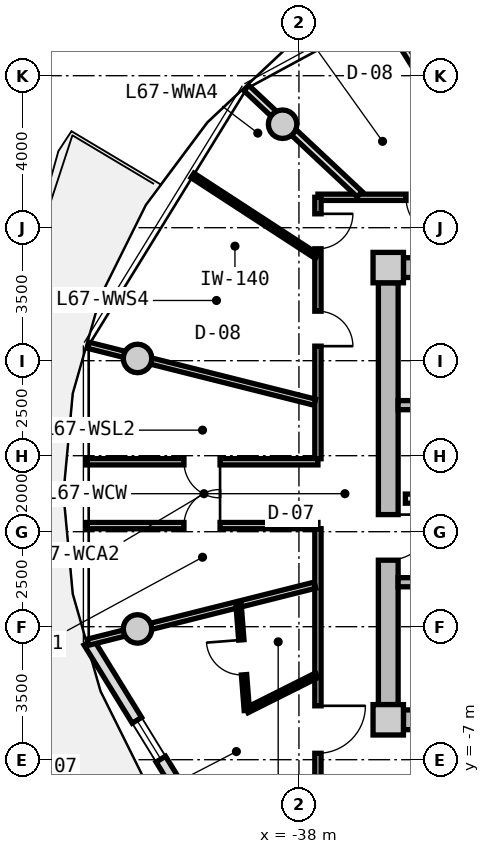
"""IFC4 building model, lengths in metres.
Left out: names, types, materials, properties, quantities, classifications, styles, units other than length and angle.
Written with IfcOpenShell. Run it as: python <this file> out.ifc"""

import sys

from ifc_helpers import new_model, si_unit, direction, frame, frame_2d, origin, origin_2d, place, context, subcontext, project, spatial, rectangle, circle, extrude, source, transform, mapped, element, fill, save


model = new_model("IFC4")
c1 = context("Model", 3, precision=1e-05, world=origin(), true_north=direction((0.0, 1.0)))
c2 = subcontext(c1, "Body", "Model", "MODEL_VIEW")
j1 = project(units=[si_unit("LENGTHUNIT", "METRE"), si_unit("PLANEANGLEUNIT", "RADIAN")], contexts=[c1])
p1 = place(None, origin())
s1 = spatial("IfcSite", under=j1, at=p1, CompositionType="ELEMENT")
p2 = place(p1, origin())
s2 = spatial("IfcBuilding", under=s1, at=p2, CompositionType="ELEMENT")
p3 = place(p2, frame((0.0, 0.0, 216.95)))
s3 = spatial("IfcBuildingStorey", under=s2, at=p3, CompositionType="ELEMENT", Elevation=216.95)
m1 = source(origin(), c2, "Body", "SweptSolid", [
    extrude(rectangle(XDim=0.8, YDim=0.8, at=origin_2d()), origin(), (0.0, 0.0, 1.0), 3.05),
])
for number, where, z_axis, x_axis in (
    (1, (-35.65, -5.95, 0.0), (0.0, 0.0, 1.0), (1.0, 0.0, 0.0)),
    (2, (-35.65, 5.95, 0.0), (0.0, 0.0, 1.0), (1.0, 0.0, 0.0)),
):
    element("IfcColumn", number, at=place(p3, frame(where, z_axis=z_axis, x_axis=x_axis)), inside=s3, PredefinedType="COLUMN", context=c2, shape_type="MappedRepresentation", body=[
        mapped(m1, transform((0.0, 0.0, 0.0), x_axis=(1.0, 0.0, 0.0), y_axis=(0.0, 1.0, 0.0), z_axis=(0.0, 0.0, 1.0), scale=1.0)),
    ])
m2 = source(origin(), c2, "Body", "SweptSolid", [
    extrude(rectangle(XDim=14.5, YDim=0.52, at=frame_2d((7.25, 0.0))), origin(), (0.0, 0.0, 1.0), 2.76),
])
for number, where, z_axis, x_axis in (
    (3, (-35.25, 5.95, 0.0), (0.0, 0.0, 1.0), (1.0, 0.0, 0.0)),
    (4, (-20.75, -5.95, 0.0), (0.0, 0.0, 1.0), (-1.0, 0.0, 0.0)),
):
    element("IfcWall", number, at=place(p3, frame(where, z_axis=z_axis, x_axis=x_axis)), inside=s3, PredefinedType="SHEAR", context=c2, shape_type="MappedRepresentation", body=[
        mapped(m2, transform((0.0, 0.0, 0.0), x_axis=(1.0, 0.0, 0.0), y_axis=(0.0, 1.0, 0.0), z_axis=(0.0, 0.0, 1.0), scale=1.0)),
    ])
m3 = source(origin(), c2, "Body", "SweptSolid", [
    extrude(rectangle(XDim=11.1, YDim=0.52, at=frame_2d((5.55, 0.0))), origin(), (0.0, 0.0, 1.0), 2.76),
])
p4 = place(p3, frame((-35.65, -5.55, 0.0), z_axis=(0.0, 0.0, 1.0), x_axis=(0.0, 1.0, 0.0)))
e5 = element("IfcWall", 5, at=p4, inside=s3, PredefinedType="SHEAR", context=c2, shape_type="MappedRepresentation", body=[
    mapped(m3, transform((0.0, 0.0, 0.0), x_axis=(1.0, 0.0, 0.0), y_axis=(0.0, 1.0, 0.0), z_axis=(0.0, 0.0, 1.0), scale=1.0)),
])
p5 = place(p4, frame((3.8, 0.0, 0.0)))
e6 = element("IfcOpeningElement", 6, at=p5, cuts=e5, PredefinedType="OPENING", context=c2, shape_type="SweptSolid", body=[
    extrude(rectangle(XDim=1.2, YDim=2.15, at=frame_2d((0.6, 1.075))), frame((0.0, 0.27, 0.0), z_axis=(0.0, -1.0, 0.0), x_axis=(1.0, 0.0, 0.0)), (0.0, 0.0, 1.0), 0.54),
])
m4 = source(origin(), c2, "Body", "SweptSolid", [
    extrude(circle(Radius=0.375, at=origin_2d()), origin(), (0.0, 0.0, 1.0), 3.05),
])
for number, where, z_axis, x_axis in (
    (7, (-38.43, 9.723, 0.0), (0.0, 0.0, 1.0), (1.0, 0.0, 0.0)),
    (8, (-42.247, 3.559, 0.0), (0.0, 0.0, 1.0), (1.0, 0.0, 0.0)),
    (9, (-42.247, -3.559, 0.0), (0.0, 0.0, 1.0), (1.0, 0.0, 0.0)),
):
    element("IfcColumn", number, at=place(p3, frame(where, z_axis=z_axis, x_axis=x_axis)), inside=s3, PredefinedType="COLUMN", context=c2, shape_type="MappedRepresentation", body=[
        mapped(m4, transform((0.0, 0.0, 0.0), x_axis=(1.0, 0.0, 0.0), y_axis=(0.0, 1.0, 0.0), z_axis=(0.0, 0.0, 1.0), scale=1.0)),
    ])
m5 = source(origin(), c2, "Body", "SweptSolid", [
    extrude(rectangle(XDim=7.938, YDim=0.29, at=frame_2d((3.969, 0.0))), origin(), (0.0, 0.0, 1.0), 2.76),
])
p6 = place(p3, frame((-39.37, -10.663, 0.0), z_axis=(0.0, 0.0, 1.0), x_axis=(-0.524244987663, 0.851567491694, 0.0)))
e10 = element("IfcWall", 10, at=p6, inside=s3, PredefinedType="SOLIDWALL", context=c2, shape_type="MappedRepresentation", body=[
    mapped(m5, transform((0.0, 0.0, 0.0), x_axis=(1.0, 0.0, 0.0), y_axis=(0.0, 1.0, 0.0), z_axis=(0.0, 0.0, 1.0), scale=1.0)),
])
p7 = place(p6, frame((0.9, 0.0, 0.0)))
e11 = element("IfcOpeningElement", 11, at=p7, cuts=e10, PredefinedType="OPENING", context=c2, shape_type="SweptSolid", body=[
    extrude(rectangle(XDim=1.15, YDim=2.25, at=frame_2d((0.575, 1.125))), frame((0.0, 0.155, 0.0), z_axis=(0.0, -1.0, 0.0), x_axis=(1.0, 0.0, 0.0)), (0.0, 0.0, 1.0), 0.31),
])
p8 = place(p6, frame((4.319, 0.0, 0.85)))
e12 = element("IfcOpeningElement", 12, at=p8, cuts=e10, PredefinedType="OPENING", context=c2, shape_type="SweptSolid", body=[
    extrude(rectangle(XDim=1.2, YDim=1.5, at=frame_2d((0.6, 0.75))), frame((0.0, 0.155, 0.0), z_axis=(0.0, -1.0, 0.0), x_axis=(1.0, 0.0, 0.0)), (0.0, 0.0, 1.0), 0.31),
])
m6 = source(origin(), c2, "Body", "SweptSolid", [
    extrude(rectangle(XDim=7.93, YDim=0.24, at=frame_2d((3.965, 0.0))), origin(), (0.0, 0.0, 1.0), 2.76),
])
p9 = place(p3, frame((-35.39, 2.33, 0.0), z_axis=(0.0, 0.0, 1.0), x_axis=(1.0, 0.0, 0.0)))
e13 = element("IfcWall", 13, at=p9, inside=s3, PredefinedType="PARTITIONING", context=c2, shape_type="MappedRepresentation", body=[
    mapped(m6, transform((0.0, 0.0, 0.0), x_axis=(1.0, 0.0, 0.0), y_axis=(0.0, 1.0, 0.0), z_axis=(0.0, 0.0, 1.0), scale=1.0)),
])
p10 = place(p3, frame((-35.39, -2.33, 0.0), z_axis=(0.0, 0.0, 1.0), x_axis=(1.0, 0.0, 0.0)))
e14 = element("IfcWall", 14, at=p10, inside=s3, PredefinedType="PARTITIONING", context=c2, shape_type="MappedRepresentation", body=[
    mapped(m6, transform((0.0, 0.0, 0.0), x_axis=(1.0, 0.0, 0.0), y_axis=(0.0, 1.0, 0.0), z_axis=(0.0, 0.0, 1.0), scale=1.0)),
])
p11 = place(p10, frame((1.05, 0.0, 0.0)))
e15 = element("IfcOpeningElement", 15, at=p11, cuts=e14, PredefinedType="OPENING", context=c2, shape_type="SweptSolid", body=[
    extrude(rectangle(XDim=1.1, YDim=2.15, at=frame_2d((0.55, 1.075))), frame((0.0, 0.13, 0.0), z_axis=(0.0, -1.0, 0.0), x_axis=(1.0, 0.0, 0.0)), (0.0, 0.0, 1.0), 0.26),
])
m7 = source(origin(), c2, "Body", "SweptSolid", [
    extrude(rectangle(XDim=7.62, YDim=0.24, at=frame_2d((3.81, 0.0))), origin(), (0.0, 0.0, 1.0), 2.745),
])
p12 = place(p3, frame((-35.2, -0.13, 0.0), z_axis=(0.0, 0.0, 1.0), x_axis=(1.0, 0.0, 0.0)))
e16 = element("IfcWall", 16, at=p12, inside=s3, PredefinedType="PARTITIONING", context=c2, shape_type="MappedRepresentation", body=[
    mapped(m7, transform((0.0, 0.0, 0.0), x_axis=(1.0, 0.0, 0.0), y_axis=(0.0, 1.0, 0.0), z_axis=(0.0, 0.0, 1.0), scale=1.0)),
])
p13 = place(p12, frame((6.22, 0.0, 0.0)))
e17 = element("IfcOpeningElement", 17, at=p13, cuts=e16, PredefinedType="OPENING", context=c2, shape_type="SweptSolid", body=[
    extrude(rectangle(XDim=1.0, YDim=2.1, at=frame_2d((0.5, 1.05))), frame((0.0, 0.13, 0.0), z_axis=(0.0, -1.0, 0.0), x_axis=(1.0, 0.0, 0.0)), (0.0, 0.0, 1.0), 0.26),
])
p14 = place(p12, frame((2.4, 0.0, 0.0)))
e18 = element("IfcOpeningElement", 18, at=p14, cuts=e16, PredefinedType="OPENING", context=c2, shape_type="SweptSolid", body=[
    extrude(rectangle(XDim=1.0, YDim=2.1, at=frame_2d((0.5, 1.05))), frame((0.0, 0.13, 0.0), z_axis=(0.0, -1.0, 0.0), x_axis=(1.0, 0.0, 0.0)), (0.0, 0.0, 1.0), 0.26),
])
m8 = source(origin(), c2, "Body", "SweptSolid", [
    extrude(rectangle(XDim=8.58, YDim=0.165, at=frame_2d((4.29, 0.0))), origin(), (0.0, 0.0, 1.0), 2.745),
])
p15 = place(p3, frame((-37.5, 7.8, 0.0), z_axis=(0.0, 0.0, 1.0), x_axis=(1.0, 0.0, 0.0)))
e19 = element("IfcWall", 19, at=p15, inside=s3, PredefinedType="PARTITIONING", context=c2, shape_type="MappedRepresentation", body=[
    mapped(m8, transform((0.0, 0.0, 0.0), x_axis=(1.0, 0.0, 0.0), y_axis=(0.0, 1.0, 0.0), z_axis=(0.0, 0.0, 1.0), scale=1.0)),
])
p16 = place(p15, frame((5.408, 0.0, 0.0)))
e20 = element("IfcOpeningElement", 20, at=p16, cuts=e19, PredefinedType="OPENING", context=c2, shape_type="SweptSolid", body=[
    extrude(rectangle(XDim=1.05, YDim=2.15, at=frame_2d((0.525, 1.075))), frame((0.0, 0.093, 0.0), z_axis=(0.0, -1.0, 0.0), x_axis=(1.0, 0.0, 0.0)), (0.0, 0.0, 1.0), 0.185),
])
p17 = place(p15, frame((2.317, 0.0, 0.0)))
e21 = element("IfcOpeningElement", 21, at=p17, cuts=e19, PredefinedType="OPENING", context=c2, shape_type="SweptSolid", body=[
    extrude(rectangle(XDim=1.05, YDim=2.15, at=frame_2d((0.525, 1.075))), frame((0.0, 0.093, 0.0), z_axis=(0.0, -1.0, 0.0), x_axis=(1.0, 0.0, 0.0)), (0.0, 0.0, 1.0), 0.185),
])
m9 = source(origin(), c2, "Body", "SweptSolid", [
    extrude(rectangle(XDim=6.88, YDim=0.165, at=frame_2d((3.44, 0.0))), origin(), (0.0, 0.0, 1.0), 2.745),
])
p18 = place(p3, frame((-37.5, -7.8, 0.0), z_axis=(0.0, 0.0, 1.0), x_axis=(0.0, 1.0, 0.0)))
e22 = element("IfcWall", 22, at=p18, inside=s3, PredefinedType="PARTITIONING", context=c2, shape_type="MappedRepresentation", body=[
    mapped(m9, transform((0.0, 0.0, 0.0), x_axis=(1.0, 0.0, 0.0), y_axis=(0.0, 1.0, 0.0), z_axis=(0.0, 0.0, 1.0), scale=1.0)),
])
p19 = place(p18, frame((0.968, 0.0, 0.0)))
e23 = element("IfcOpeningElement", 23, at=p19, cuts=e22, PredefinedType="OPENING", context=c2, shape_type="SweptSolid", body=[
    extrude(rectangle(XDim=1.25, YDim=2.2, at=frame_2d((0.625, 1.1))), frame((0.0, 0.093, 0.0), z_axis=(0.0, -1.0, 0.0), x_axis=(1.0, 0.0, 0.0)), (0.0, 0.0, 1.0), 0.185),
])
p20 = place(p3, frame((-37.5, 0.92, 0.0), z_axis=(0.0, 0.0, 1.0), x_axis=(0.0, 1.0, 0.0)))
e24 = element("IfcWall", 24, at=p20, inside=s3, PredefinedType="PARTITIONING", context=c2, shape_type="MappedRepresentation", body=[
    mapped(m9, transform((0.0, 0.0, 0.0), x_axis=(1.0, 0.0, 0.0), y_axis=(0.0, 1.0, 0.0), z_axis=(0.0, 0.0, 1.0), scale=1.0)),
])
p21 = place(p20, frame((5.525, 0.0, 0.0)))
e25 = element("IfcOpeningElement", 25, at=p21, cuts=e24, PredefinedType="OPENING", context=c2, shape_type="SweptSolid", body=[
    extrude(rectangle(XDim=0.92, YDim=2.1, at=frame_2d((0.46, 1.05))), frame((0.0, 0.093, 0.0), z_axis=(0.0, -1.0, 0.0), x_axis=(1.0, 0.0, 0.0)), (0.0, 0.0, 1.0), 0.185),
])
p22 = place(p20, frame((2.962, 0.0, 0.0)))
e26 = element("IfcOpeningElement", 26, at=p22, cuts=e24, PredefinedType="OPENING", context=c2, shape_type="SweptSolid", body=[
    extrude(rectangle(XDim=0.92, YDim=2.1, at=frame_2d((0.46, 1.05))), frame((0.0, 0.093, 0.0), z_axis=(0.0, -1.0, 0.0), x_axis=(1.0, 0.0, 0.0)), (0.0, 0.0, 1.0), 0.185),
])
m10 = source(origin(), c2, "Body", "SweptSolid", [
    extrude(rectangle(XDim=6.157, YDim=0.165, at=frame_2d((3.079, 0.0))), origin(), (0.0, 0.0, 1.0), 2.345),
])
for number, where, z_axis, x_axis in (
    (27, (-37.58, 2.407, 0.0), (0.0, 0.0, 1.0), (-0.97, 0.244, 0.0)),
    (28, (-37.58, -2.407, 0.0), (0.0, 0.0, 1.0), (-0.97, -0.244, 0.0)),
):
    element("IfcWall", number, at=place(p3, frame(where, z_axis=z_axis, x_axis=x_axis)), inside=s3, PredefinedType="PARTITIONING", context=c2, shape_type="MappedRepresentation", body=[
        mapped(m10, transform((0.0, 0.0, 0.0), x_axis=(1.0, 0.0, 0.0), y_axis=(0.0, 1.0, 0.0), z_axis=(0.0, 0.0, 1.0), scale=1.0)),
    ])
m11 = source(origin(), c2, "Body", "SweptSolid", [
    extrude(rectangle(XDim=6.101, YDim=0.165, at=frame_2d((3.051, 0.0))), origin(), (0.0, 0.0, 1.0), 2.745),
])
p23 = place(p3, frame((-43.601, 0.84, 0.0), z_axis=(0.0, 0.0, 1.0), x_axis=(1.0, 0.0, 0.0)))
e29 = element("IfcWall", 29, at=p23, inside=s3, PredefinedType="PARTITIONING", context=c2, shape_type="MappedRepresentation", body=[
    mapped(m11, transform((0.0, 0.0, 0.0), x_axis=(1.0, 0.0, 0.0), y_axis=(0.0, 1.0, 0.0), z_axis=(0.0, 0.0, 1.0), scale=1.0)),
])
p24 = place(p23, frame((2.576, 0.0, 0.0)))
e30 = element("IfcOpeningElement", 30, at=p24, cuts=e29, PredefinedType="OPENING", context=c2, shape_type="SweptSolid", body=[
    extrude(rectangle(XDim=0.95, YDim=2.1, at=frame_2d((0.475, 1.05))), frame((0.0, 0.093, 0.0), z_axis=(0.0, -1.0, 0.0), x_axis=(1.0, 0.0, 0.0)), (0.0, 0.0, 1.0), 0.185),
])
p25 = place(p3, frame((-37.5, -0.84, 0.0), z_axis=(0.0, 0.0, 1.0), x_axis=(-1.0, 0.0, 0.0)))
e31 = element("IfcWall", 31, at=p25, inside=s3, PredefinedType="PARTITIONING", context=c2, shape_type="MappedRepresentation", body=[
    mapped(m11, transform((0.0, 0.0, 0.0), x_axis=(1.0, 0.0, 0.0), y_axis=(0.0, 1.0, 0.0), z_axis=(0.0, 0.0, 1.0), scale=1.0)),
])
p26 = place(p25, frame((2.576, 0.0, 0.0)))
e32 = element("IfcOpeningElement", 32, at=p26, cuts=e31, PredefinedType="OPENING", context=c2, shape_type="SweptSolid", body=[
    extrude(rectangle(XDim=0.95, YDim=2.1, at=frame_2d((0.475, 1.05))), frame((0.0, 0.093, 0.0), z_axis=(0.0, -1.0, 0.0), x_axis=(1.0, 0.0, 0.0)), (0.0, 0.0, 1.0), 0.185),
])
m12 = source(origin(), c2, "Body", "SweptSolid", [
    extrude(rectangle(XDim=4.089, YDim=0.19, at=frame_2d((2.044, 0.0))), origin(), (0.0, 0.0, 1.0), 2.345),
])
p27 = place(p3, frame((-36.402, 7.88, 0.0), z_axis=(0.0, 0.0, 1.0), x_axis=(-0.729401273609, 0.684086092577, 0.0)))
e33 = element("IfcWall", 33, at=p27, inside=s3, PredefinedType="PARTITIONING", context=c2, shape_type="MappedRepresentation", body=[
    mapped(m12, transform((0.0, 0.0, 0.0), x_axis=(1.0, 0.0, 0.0), y_axis=(0.0, 1.0, 0.0), z_axis=(0.0, 0.0, 1.0), scale=1.0)),
])
m13 = source(origin(), c2, "Body", "SweptSolid", [
    extrude(rectangle(XDim=5.652, YDim=0.19, at=frame_2d((2.826, 0.0))), origin(), (0.0, 0.0, 1.0), 2.745),
])
p28 = place(p3, frame((-32.794, 7.83, 0.0), z_axis=(0.0, 0.0, 1.0), x_axis=(-0.527566076956, 0.84951399897, 0.0)))
e34 = element("IfcWall", 34, at=p28, inside=s3, PredefinedType="PARTITIONING", context=c2, shape_type="MappedRepresentation", body=[
    mapped(m13, transform((0.0, 0.0, 0.0), x_axis=(1.0, 0.0, 0.0), y_axis=(0.0, 1.0, 0.0), z_axis=(0.0, 0.0, 1.0), scale=1.0)),
])
m14 = source(origin(), c2, "Body", "SweptSolid", [
    extrude(rectangle(XDim=3.904, YDim=0.14, at=frame_2d((1.952, 0.0))), origin(), (0.0, 0.0, 1.0), 2.745),
])
p29 = place(p3, frame((-37.53, 6.246, 0.0), z_axis=(0.0, 0.0, 1.0), x_axis=(-0.838024687996, 0.545632314209, 0.0)))
e35 = element("IfcWall", 35, at=p29, inside=s3, PredefinedType="PARTITIONING", context=c2, shape_type="MappedRepresentation", body=[
    mapped(m14, transform((0.0, 0.0, 0.0), x_axis=(1.0, 0.0, 0.0), y_axis=(0.0, 1.0, 0.0), z_axis=(0.0, 0.0, 1.0), scale=1.0)),
])
m15 = source(origin(), c2, "Body", "SweptSolid", [
    extrude(rectangle(XDim=2.06, YDim=0.14, at=frame_2d((1.03, 0.0))), origin(), (0.0, 0.0, 1.0), 2.745),
])
p30 = place(p3, frame((-37.53, -4.778, 0.0), z_axis=(0.0, 0.0, 1.0), x_axis=(-0.893952568722, -0.448161583444, 0.0)))
e36 = element("IfcWall", 36, at=p30, inside=s3, PredefinedType="PARTITIONING", context=c2, shape_type="MappedRepresentation", body=[
    mapped(m15, transform((0.0, 0.0, 0.0), x_axis=(1.0, 0.0, 0.0), y_axis=(0.0, 1.0, 0.0), z_axis=(0.0, 0.0, 1.0), scale=1.0)),
])
m16 = source(origin(), c2, "Body", "SweptSolid", [
    extrude(rectangle(XDim=2.798, YDim=0.14, at=frame_2d((1.399, 0.0))), origin(), (0.0, 0.0, 1.0), 2.745),
])
p31 = place(p3, frame((-39.371, -5.701, 0.0), z_axis=(0.0, 0.0, 1.0), x_axis=(-0.077823984089, 0.996967114553, 0.0)))
e37 = element("IfcWall", 37, at=p31, inside=s3, PredefinedType="PARTITIONING", context=c2, shape_type="MappedRepresentation", body=[
    mapped(m16, transform((0.0, 0.0, 0.0), x_axis=(1.0, 0.0, 0.0), y_axis=(0.0, 1.0, 0.0), z_axis=(0.0, 0.0, 1.0), scale=1.0)),
])
p32 = place(p31, frame((0.939, 0.0, 0.0)))
e38 = element("IfcOpeningElement", 38, at=p32, cuts=e37, PredefinedType="OPENING", context=c2, shape_type="SweptSolid", body=[
    extrude(rectangle(XDim=0.92, YDim=2.1, at=frame_2d((0.46, 1.05))), frame((0.0, 0.08, 0.0), z_axis=(0.0, -1.0, 0.0), x_axis=(1.0, 0.0, 0.0)), (0.0, 0.0, 1.0), 0.16),
])
m17 = source(origin(), c2, "Body", "SweptSolid", [
    extrude(rectangle(XDim=1.2, YDim=1.5, at=frame_2d((0.6, 0.75))), frame((0.0, 0.03, 0.0), z_axis=(0.0, -1.0, 0.0), x_axis=(1.0, 0.0, 0.0)), (0.0, 0.0, 1.0), 0.06),
])
p33 = place(p8, origin())
e39 = element("IfcWindow", 39, at=p33, inside=s3, PartitioningType="SINGLE_PANEL", PredefinedType="WINDOW", context=c2, shape_type="MappedRepresentation", body=[
    mapped(m17, transform((0.0, 0.0, 0.0), x_axis=(1.0, 0.0, 0.0), y_axis=(0.0, 1.0, 0.0), z_axis=(0.0, 0.0, 1.0), scale=1.0)),
])
fill(e12, e39)
m18 = source(origin(), c2, "Body", "SweptSolid", [
    extrude(rectangle(XDim=1.2, YDim=2.15, at=frame_2d((0.6, 1.075))), frame((0.0, 0.025, 0.0), z_axis=(0.0, -1.0, 0.0), x_axis=(1.0, 0.0, 0.0)), (0.0, 0.0, 1.0), 0.05),
])
p34 = place(p5, frame((1.2, 0.0, 0.0), z_axis=(0.0, 0.0, 1.0), x_axis=(-1.0, 0.0, 0.0)))
e40 = element("IfcDoor", 40, at=p34, inside=s3, OperationType="SINGLE_SWING_LEFT", PredefinedType="DOOR", context=c2, shape_type="MappedRepresentation", body=[
    mapped(m18, transform((0.0, 0.0, 0.0), x_axis=(1.0, 0.0, 0.0), y_axis=(0.0, 1.0, 0.0), z_axis=(0.0, 0.0, 1.0), scale=1.0)),
])
fill(e6, e40)
m19 = source(origin(), c2, "Body", "SweptSolid", [
    extrude(rectangle(XDim=0.95, YDim=2.1, at=frame_2d((0.475, 1.05))), frame((0.0, 0.025, 0.0), z_axis=(0.0, -1.0, 0.0), x_axis=(1.0, 0.0, 0.0)), (0.0, 0.0, 1.0), 0.05),
])
p35 = place(p26, frame((0.95, 0.0, 0.0), z_axis=(0.0, 0.0, 1.0), x_axis=(-1.0, 0.0, 0.0)))
e41 = element("IfcDoor", 41, at=p35, inside=s3, OperationType="SINGLE_SWING_RIGHT", PredefinedType="DOOR", context=c2, shape_type="MappedRepresentation", body=[
    mapped(m19, transform((0.0, 0.0, 0.0), x_axis=(1.0, 0.0, 0.0), y_axis=(0.0, 1.0, 0.0), z_axis=(0.0, 0.0, 1.0), scale=1.0)),
])
fill(e32, e41)
p36 = place(p24, frame((0.95, 0.0, 0.0), z_axis=(0.0, 0.0, 1.0), x_axis=(-1.0, 0.0, 0.0)))
e42 = element("IfcDoor", 42, at=p36, inside=s3, OperationType="SINGLE_SWING_LEFT", PredefinedType="DOOR", context=c2, shape_type="MappedRepresentation", body=[
    mapped(m19, transform((0.0, 0.0, 0.0), x_axis=(1.0, 0.0, 0.0), y_axis=(0.0, 1.0, 0.0), z_axis=(0.0, 0.0, 1.0), scale=1.0)),
])
fill(e30, e42)
m20 = source(origin(), c2, "Body", "SweptSolid", [
    extrude(rectangle(XDim=1.05, YDim=2.15, at=frame_2d((0.525, 1.075))), frame((0.0, 0.025, 0.0), z_axis=(0.0, -1.0, 0.0), x_axis=(1.0, 0.0, 0.0)), (0.0, 0.0, 1.0), 0.05),
])
p37 = place(p17, frame((1.05, 0.0, 0.0), z_axis=(0.0, 0.0, 1.0), x_axis=(-1.0, 0.0, 0.0)))
e43 = element("IfcDoor", 43, at=p37, inside=s3, OperationType="SINGLE_SWING_LEFT", PredefinedType="DOOR", context=c2, shape_type="MappedRepresentation", body=[
    mapped(m20, transform((0.0, 0.0, 0.0), x_axis=(1.0, 0.0, 0.0), y_axis=(0.0, 1.0, 0.0), z_axis=(0.0, 0.0, 1.0), scale=1.0)),
])
fill(e21, e43)
m21 = source(origin(), c2, "Body", "SweptSolid", [
    extrude(rectangle(XDim=0.92, YDim=2.1, at=frame_2d((0.46, 1.05))), frame((0.0, 0.025, 0.0), z_axis=(0.0, -1.0, 0.0), x_axis=(1.0, 0.0, 0.0)), (0.0, 0.0, 1.0), 0.05),
])
p38 = place(p21, frame((0.92, 0.0, 0.0), z_axis=(0.0, 0.0, 1.0), x_axis=(-1.0, 0.0, 0.0)))
e44 = element("IfcDoor", 44, at=p38, inside=s3, OperationType="SINGLE_SWING_LEFT", PredefinedType="DOOR", context=c2, shape_type="MappedRepresentation", body=[
    mapped(m21, transform((0.0, 0.0, 0.0), x_axis=(1.0, 0.0, 0.0), y_axis=(0.0, 1.0, 0.0), z_axis=(0.0, 0.0, 1.0), scale=1.0)),
])
fill(e25, e44)
p39 = place(p22, frame((0.92, 0.0, 0.0), z_axis=(0.0, 0.0, 1.0), x_axis=(-1.0, 0.0, 0.0)))
e45 = element("IfcDoor", 45, at=p39, inside=s3, OperationType="SINGLE_SWING_RIGHT", PredefinedType="DOOR", context=c2, shape_type="MappedRepresentation", body=[
    mapped(m21, transform((0.0, 0.0, 0.0), x_axis=(1.0, 0.0, 0.0), y_axis=(0.0, 1.0, 0.0), z_axis=(0.0, 0.0, 1.0), scale=1.0)),
])
fill(e26, e45)
m22 = source(origin(), c2, "Body", "SweptSolid", [
    extrude(rectangle(XDim=1.25, YDim=2.2, at=frame_2d((0.625, 1.1))), frame((0.0, 0.025, 0.0), z_axis=(0.0, -1.0, 0.0), x_axis=(1.0, 0.0, 0.0)), (0.0, 0.0, 1.0), 0.05),
])
p40 = place(p19, frame((1.25, 0.0, 0.0), z_axis=(0.0, 0.0, 1.0), x_axis=(-1.0, 0.0, 0.0)))
e46 = element("IfcDoor", 46, at=p40, inside=s3, OperationType="SINGLE_SWING_LEFT", PredefinedType="DOOR", context=c2, shape_type="MappedRepresentation", body=[
    mapped(m22, transform((0.0, 0.0, 0.0), x_axis=(1.0, 0.0, 0.0), y_axis=(0.0, 1.0, 0.0), z_axis=(0.0, 0.0, 1.0), scale=1.0)),
])
fill(e23, e46)
p41 = place(p32, origin())
e47 = element("IfcDoor", 47, at=p41, inside=s3, OperationType="SINGLE_SWING_RIGHT", PredefinedType="DOOR", context=c2, shape_type="MappedRepresentation", body=[
    mapped(m21, transform((0.0, 0.0, 0.0), x_axis=(1.0, 0.0, 0.0), y_axis=(0.0, 1.0, 0.0), z_axis=(0.0, 0.0, 1.0), scale=1.0)),
])
fill(e38, e47)
save(model, sys.argv[1])
